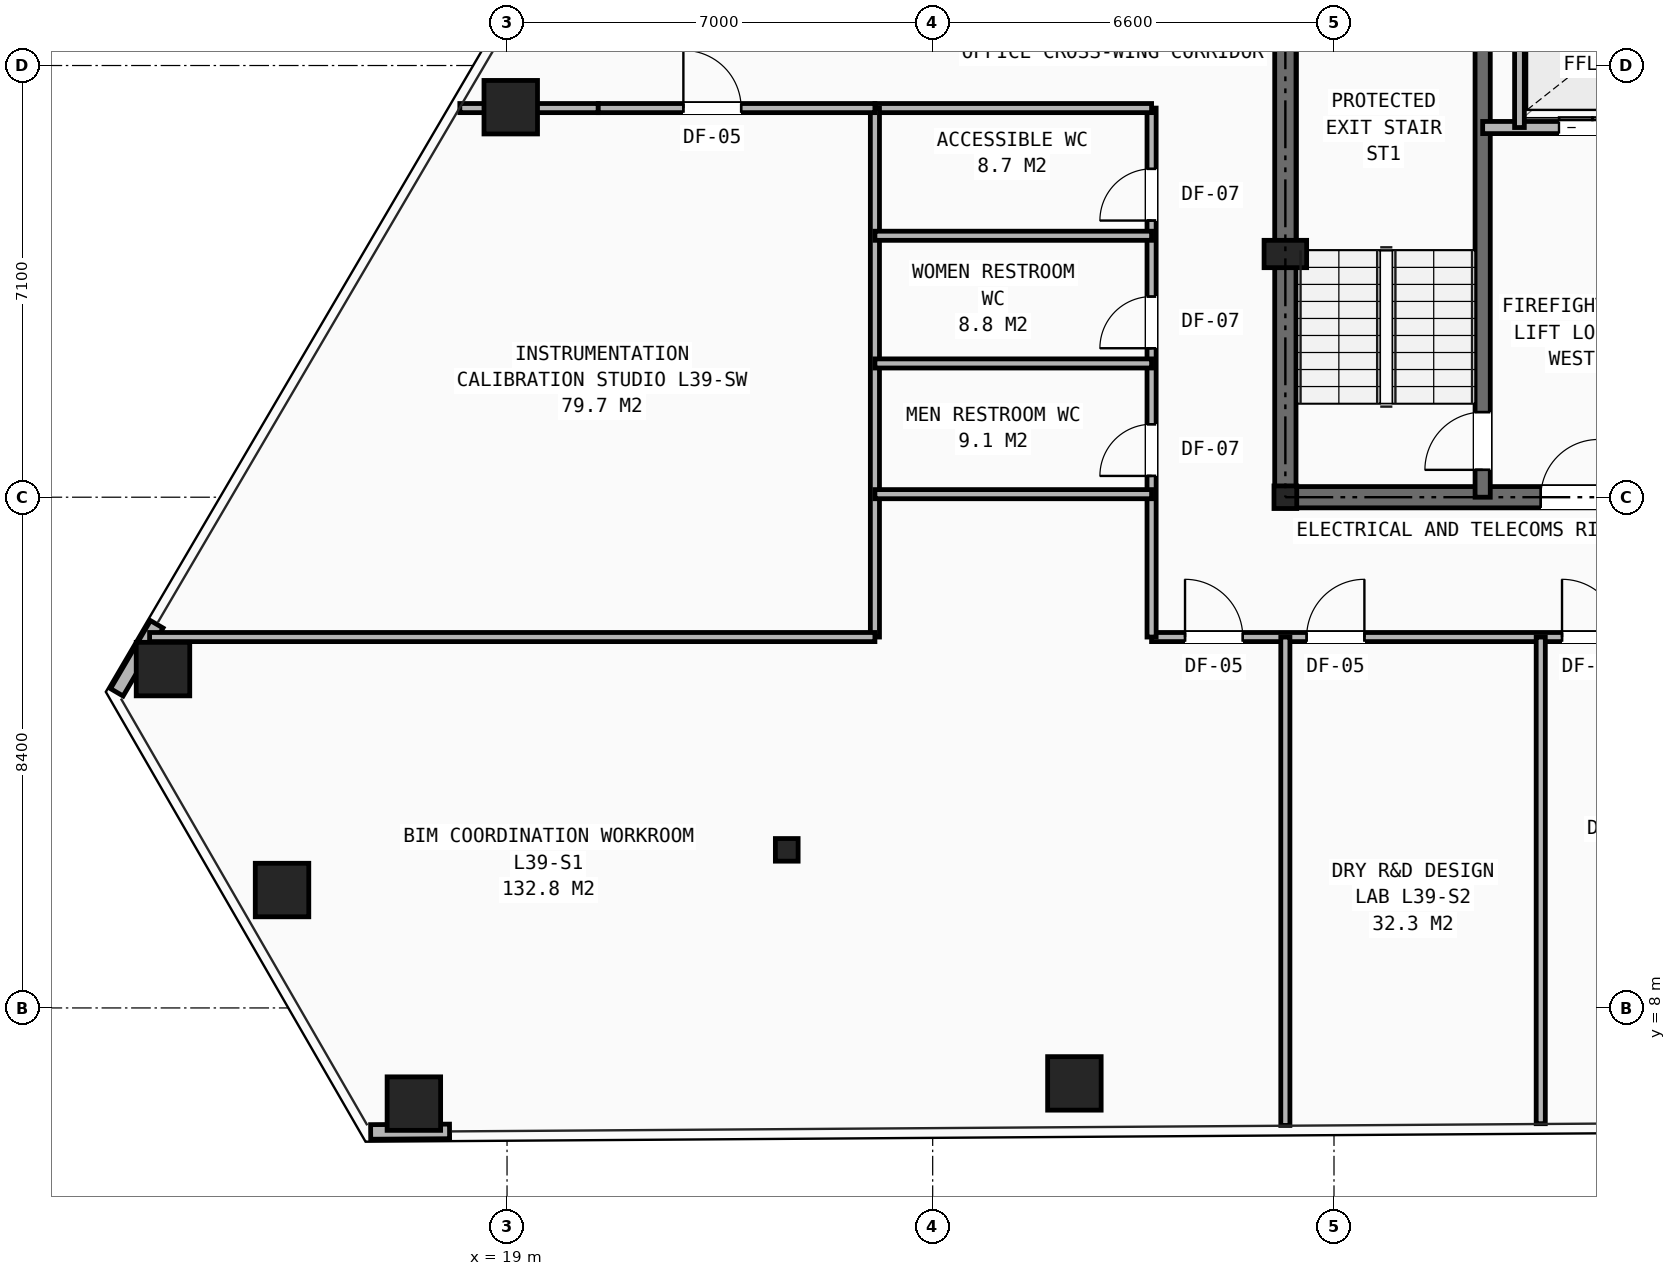
"""IFC4 building model, lengths in metres.
Left out: names, types, materials, properties, quantities, classifications, styles, units other than length and angle.
Written with IfcOpenShell. Run it as: python <this file> out.ifc"""

import sys

from ifc_helpers import new_model, si_unit, direction, frame, frame_2d, origin, origin_2d, place, context, subcontext, project, spatial, rectangle, hollow_rectangle, i_section, extrude, element, fill, save


model = new_model("IFC4")
c1 = context("Model", 3, precision=1e-05, world=origin(), true_north=direction((0.0, 1.0)))
c2 = subcontext(c1, "Body", "Model", "MODEL_VIEW")
j1 = project(units=[si_unit("LENGTHUNIT", "METRE"), si_unit("PLANEANGLEUNIT", "RADIAN")], contexts=[c1])
p1 = place(None, origin())
s1 = spatial("IfcSite", under=j1, at=p1, CompositionType="ELEMENT")
p2 = place(p1, origin())
s2 = spatial("IfcBuilding", under=s1, at=p2, CompositionType="ELEMENT")
p3 = place(p2, frame((0.0, 0.0, 136.7)))
s3 = spatial("IfcBuildingStorey", under=s2, at=p3, CompositionType="ELEMENT", Elevation=136.7)
for number, where, z_axis, x_axis in (
    (1, (31.8, 16.4, 0.0), (0.0, 0.0, 1.0), (1.0, 0.0, 0.0)),
    (2, (23.6, 10.6, 0.0), (0.0, 0.0, 1.0), (1.0, 0.0, 0.0)),
):
    element("IfcColumn", number, at=place(p3, frame(where, z_axis=z_axis, x_axis=x_axis)), inside=s3, PredefinedType="COLUMN", context=c2, shape_type="SweptSolid", body=[
        extrude(i_section(OverallWidth=0.374, OverallDepth=0.372, WebThickness=0.016, FlangeThickness=0.026, at=origin_2d()), origin(), (0.0, 0.0, 1.0), 3.45),
    ])
p4 = place(p3, frame((31.8, 20.4, 0.0), z_axis=(0.0, 0.0, 1.0), x_axis=(1.0, 0.0, 0.0)))
e3 = element("IfcColumn", 3, at=p4, inside=s3, PredefinedType="PILASTER", context=c2, shape_type="SweptSolid", body=[
    extrude(rectangle(XDim=0.7, YDim=0.45, at=origin_2d()), origin(), (0.0, 0.0, 1.0), 3.45),
])
for number, where, z_axis, x_axis in (
    (4, (19.061, 22.814, 0.0), (0.0, 0.0, 1.0), (1.0, 0.0, 0.0)),
    (5, (13.342, 13.573, 0.0), (0.0, 0.0, 1.0), (1.0, 0.0, 0.0)),
    (6, (15.3, 9.939, 0.0), (0.0, 0.0, 1.0), (1.0, 0.0, 0.0)),
    (7, (17.468, 6.427, 0.0), (0.0, 0.0, 1.0), (1.0, 0.0, 0.0)),
    (8, (28.331, 6.759, 0.0), (0.0, 0.0, 1.0), (1.0, 0.0, 0.0)),
):
    element("IfcColumn", number, at=place(p3, frame(where, z_axis=z_axis, x_axis=x_axis)), inside=s3, PredefinedType="COLUMN", context=c2, shape_type="SweptSolid", body=[
        extrude(hollow_rectangle(XDim=0.88, YDim=0.88, WallThickness=0.06, at=origin_2d()), origin(), (0.0, 0.0, 1.0), 3.45),
    ])
for number, where, z_axis, x_axis in (
    (9, (13.239, 14.31, 0.0), (0.0, 0.0, 1.0), (-0.506, -0.863, 0.0)),
    (10, (16.757, 5.961, 0.0), (0.0, 0.0, 1.0), (1.0, 0.007, 0.0)),
):
    element("IfcWall", number, at=place(p3, frame(where, z_axis=z_axis, x_axis=x_axis)), inside=s3, PredefinedType="SHEAR", context=c2, shape_type="SweptSolid", body=[
        extrude(rectangle(XDim=1.298, YDim=0.24, at=frame_2d((0.649, 0.0))), origin(), (0.0, 0.0, 1.0), 2.583),
    ])
p5 = place(p3, frame((31.8, 16.4, 0.0), z_axis=(0.0, 0.0, 1.0), x_axis=(1.0, 0.0, 0.0)))
e11 = element("IfcWall", 11, at=p5, inside=s3, PredefinedType="SHEAR", context=c2, shape_type="SweptSolid", body=[
    extrude(rectangle(XDim=16.4, YDim=0.35, at=frame_2d((8.2, 0.0))), origin(), (0.0, 0.0, 1.0), 3.21),
])
p6 = place(p5, frame((7.75, 0.0, 0.0)))
e12 = element("IfcOpeningElement", 12, at=p6, cuts=e11, PredefinedType="OPENING", context=c2, shape_type="SweptSolid", body=[
    extrude(rectangle(XDim=0.9, YDim=2.1, at=frame_2d((0.45, 1.05))), frame((0.0, 0.185, 0.0), z_axis=(0.0, -1.0, 0.0), x_axis=(1.0, 0.0, 0.0)), (0.0, 0.0, 1.0), 0.37),
])
p7 = place(p5, frame((4.2, 0.0, 0.0)))
e13 = element("IfcOpeningElement", 13, at=p7, cuts=e11, PredefinedType="OPENING", context=c2, shape_type="SweptSolid", body=[
    extrude(rectangle(XDim=0.95, YDim=2.1, at=frame_2d((0.475, 1.05))), frame((0.0, 0.185, 0.0), z_axis=(0.0, -1.0, 0.0), x_axis=(1.0, 0.0, 0.0)), (0.0, 0.0, 1.0), 0.37),
])
p8 = place(p5, frame((10.6, 0.0, 0.0)))
e14 = element("IfcOpeningElement", 14, at=p8, cuts=e11, PredefinedType="OPENING", context=c2, shape_type="SweptSolid", body=[
    extrude(rectangle(XDim=0.95, YDim=2.1, at=frame_2d((0.475, 1.05))), frame((0.0, 0.185, 0.0), z_axis=(0.0, -1.0, 0.0), x_axis=(1.0, 0.0, 0.0)), (0.0, 0.0, 1.0), 0.37),
])
p9 = place(p3, frame((31.8, 16.4, 0.0), z_axis=(0.0, 0.0, 1.0), x_axis=(0.0, 1.0, 0.0)))
e15 = element("IfcWall", 15, at=p9, inside=s3, PredefinedType="SHEAR", context=c2, shape_type="SweptSolid", body=[
    extrude(rectangle(XDim=14.8, YDim=0.35, at=frame_2d((7.4, 0.0))), origin(), (0.0, 0.0, 1.0), 3.21),
])
p10 = place(p9, frame((11.0, 0.0, 0.0)))
e16 = element("IfcOpeningElement", 16, at=p10, cuts=e15, PredefinedType="OPENING", context=c2, shape_type="SweptSolid", body=[
    extrude(rectangle(XDim=1.1, YDim=2.15, at=frame_2d((0.55, 1.075))), frame((0.0, 0.185, 0.0), z_axis=(0.0, -1.0, 0.0), x_axis=(1.0, 0.0, 0.0)), (0.0, 0.0, 1.0), 0.37),
])
p11 = place(p3, frame((35.045, 16.4, 0.0), z_axis=(0.0, 0.0, 1.0), x_axis=(0.0, 1.0, 0.0)))
e17 = element("IfcWall", 17, at=p11, inside=s3, PredefinedType="SHEAR", context=c2, shape_type="SweptSolid", body=[
    extrude(rectangle(XDim=8.4, YDim=0.25, at=frame_2d((4.2, 0.0))), origin(), (0.0, 0.0, 1.0), 3.21),
])
p12 = place(p11, frame((0.45, 0.0, 0.0)))
e18 = element("IfcOpeningElement", 18, at=p12, cuts=e17, PredefinedType="OPENING", context=c2, shape_type="SweptSolid", body=[
    extrude(rectangle(XDim=0.95, YDim=2.1, at=frame_2d((0.475, 1.05))), frame((0.0, 0.135, 0.0), z_axis=(0.0, -1.0, 0.0), x_axis=(1.0, 0.0, 0.0)), (0.0, 0.0, 1.0), 0.27),
])
p13 = place(p3, frame((35.045, 22.48, 0.0), z_axis=(0.0, 0.0, 1.0), x_axis=(1.0, 0.0, 0.0)))
e19 = element("IfcWall", 19, at=p13, inside=s3, PredefinedType="SOLIDWALL", context=c2, shape_type="SweptSolid", body=[
    extrude(rectangle(XDim=9.91, YDim=0.2, at=frame_2d((4.955, 0.0))), origin(), (0.0, 0.0, 1.0), 3.21),
])
p14 = place(p13, frame((1.255, 0.0, 0.0)))
e20 = element("IfcOpeningElement", 20, at=p14, cuts=e19, PredefinedType="OPENING", context=c2, shape_type="SweptSolid", body=[
    extrude(rectangle(XDim=1.1, YDim=2.15, at=frame_2d((0.55, 1.075))), frame((0.0, 0.11, 0.0), z_axis=(0.0, -1.0, 0.0), x_axis=(1.0, 0.0, 0.0)), (0.0, 0.0, 1.0), 0.22),
])
p15 = place(p13, frame((7.555, 0.0, 0.0)))
e21 = element("IfcOpeningElement", 21, at=p15, cuts=e19, PredefinedType="OPENING", context=c2, shape_type="SweptSolid", body=[
    extrude(rectangle(XDim=1.1, YDim=2.15, at=frame_2d((0.55, 1.075))), frame((0.0, 0.11, 0.0), z_axis=(0.0, -1.0, 0.0), x_axis=(1.0, 0.0, 0.0)), (0.0, 0.0, 1.0), 0.22),
])
p16 = place(p13, frame((4.405, 0.0, 0.0)))
e22 = element("IfcOpeningElement", 22, at=p16, cuts=e19, PredefinedType="OPENING", context=c2, shape_type="SweptSolid", body=[
    extrude(rectangle(XDim=1.1, YDim=2.15, at=frame_2d((0.55, 1.075))), frame((0.0, 0.11, 0.0), z_axis=(0.0, -1.0, 0.0), x_axis=(1.0, 0.0, 0.0)), (0.0, 0.0, 1.0), 0.22),
])
p17 = place(p3, frame((35.65, 22.48, 0.0), z_axis=(0.0, 0.0, 1.0), x_axis=(0.0, 1.0, 0.0)))
e23 = element("IfcWall", 23, at=p17, inside=s3, PredefinedType="SOLIDWALL", context=c2, shape_type="SweptSolid", body=[
    extrude(rectangle(XDim=2.32, YDim=0.16, at=frame_2d((1.16, 0.0))), origin(), (0.0, 0.0, 1.0), 3.21),
])
p18 = place(p3, frame((29.6, 14.1, 0.0), z_axis=(0.0, 0.0, 1.0), x_axis=(1.0, 0.0, 0.0)))
e24 = element("IfcWall", 24, at=p18, inside=s3, PredefinedType="PARTITIONING", context=c2, shape_type="SweptSolid", body=[
    extrude(rectangle(XDim=18.6, YDim=0.15, at=frame_2d((9.3, 0.0))), origin(), (0.0, 0.0, 1.0), 2.225),
])
p19 = place(p18, frame((0.55, 0.0, 0.0)))
e25 = element("IfcOpeningElement", 25, at=p19, cuts=e24, PredefinedType="OPENING", context=c2, shape_type="SweptSolid", body=[
    extrude(rectangle(XDim=0.95, YDim=2.1, at=frame_2d((0.475, 1.05))), frame((0.0, 0.085, 0.0), z_axis=(0.0, -1.0, 0.0), x_axis=(1.0, 0.0, 0.0)), (0.0, 0.0, 1.0), 0.17),
])
p20 = place(p18, frame((2.55, 0.0, 0.0)))
e26 = element("IfcOpeningElement", 26, at=p20, cuts=e24, PredefinedType="OPENING", context=c2, shape_type="SweptSolid", body=[
    extrude(rectangle(XDim=0.95, YDim=2.1, at=frame_2d((0.475, 1.05))), frame((0.0, 0.085, 0.0), z_axis=(0.0, -1.0, 0.0), x_axis=(1.0, 0.0, 0.0)), (0.0, 0.0, 1.0), 0.17),
])
p21 = place(p18, frame((6.75, 0.0, 0.0)))
e27 = element("IfcOpeningElement", 27, at=p21, cuts=e24, PredefinedType="OPENING", context=c2, shape_type="SweptSolid", body=[
    extrude(rectangle(XDim=0.95, YDim=2.1, at=frame_2d((0.475, 1.05))), frame((0.0, 0.085, 0.0), z_axis=(0.0, -1.0, 0.0), x_axis=(1.0, 0.0, 0.0)), (0.0, 0.0, 1.0), 0.17),
])
p22 = place(p18, frame((10.95, 0.0, 0.0)))
e28 = element("IfcOpeningElement", 28, at=p22, cuts=e24, PredefinedType="OPENING", context=c2, shape_type="SweptSolid", body=[
    extrude(rectangle(XDim=0.95, YDim=2.1, at=frame_2d((0.475, 1.05))), frame((0.0, 0.085, 0.0), z_axis=(0.0, -1.0, 0.0), x_axis=(1.0, 0.0, 0.0)), (0.0, 0.0, 1.0), 0.17),
])
p23 = place(p18, frame((15.15, 0.0, 0.0)))
e29 = element("IfcOpeningElement", 29, at=p23, cuts=e24, PredefinedType="OPENING", context=c2, shape_type="SweptSolid", body=[
    extrude(rectangle(XDim=0.95, YDim=2.1, at=frame_2d((0.475, 1.05))), frame((0.0, 0.085, 0.0), z_axis=(0.0, -1.0, 0.0), x_axis=(1.0, 0.0, 0.0)), (0.0, 0.0, 1.0), 0.17),
])
p24 = place(p3, frame((29.6, 14.1, 0.0), z_axis=(0.0, 0.0, 1.0), x_axis=(0.0, 1.0, 0.0)))
e30 = element("IfcWall", 30, at=p24, inside=s3, PredefinedType="PARTITIONING", context=c2, shape_type="SweptSolid", body=[
    extrude(rectangle(XDim=8.7, YDim=0.15, at=frame_2d((4.35, 0.0))), origin(), (0.0, 0.0, 1.0), 3.21),
])
p25 = place(p24, frame((2.65, 0.0, 0.0)))
e31 = element("IfcOpeningElement", 31, at=p25, cuts=e30, PredefinedType="OPENING", context=c2, shape_type="SweptSolid", body=[
    extrude(rectangle(XDim=0.85, YDim=2.05, at=frame_2d((0.425, 1.025))), frame((0.0, 0.085, 0.0), z_axis=(0.0, -1.0, 0.0), x_axis=(1.0, 0.0, 0.0)), (0.0, 0.0, 1.0), 0.17),
])
p26 = place(p24, frame((4.75, 0.0, 0.0)))
e32 = element("IfcOpeningElement", 32, at=p26, cuts=e30, PredefinedType="OPENING", context=c2, shape_type="SweptSolid", body=[
    extrude(rectangle(XDim=0.85, YDim=2.05, at=frame_2d((0.425, 1.025))), frame((0.0, 0.085, 0.0), z_axis=(0.0, -1.0, 0.0), x_axis=(1.0, 0.0, 0.0)), (0.0, 0.0, 1.0), 0.17),
])
p27 = place(p24, frame((6.85, 0.0, 0.0)))
e33 = element("IfcOpeningElement", 33, at=p27, cuts=e30, PredefinedType="OPENING", context=c2, shape_type="SweptSolid", body=[
    extrude(rectangle(XDim=0.85, YDim=2.05, at=frame_2d((0.425, 1.025))), frame((0.0, 0.085, 0.0), z_axis=(0.0, -1.0, 0.0), x_axis=(1.0, 0.0, 0.0)), (0.0, 0.0, 1.0), 0.17),
])
p28 = place(p3, frame((18.224, 22.8, 0.0), z_axis=(0.0, 0.0, 1.0), x_axis=(1.0, 0.0, 0.0)))
e34 = element("IfcWall", 34, at=p28, inside=s3, PredefinedType="PARTITIONING", context=c2, shape_type="SweptSolid", body=[
    extrude(rectangle(XDim=2.276, YDim=0.15, at=frame_2d((1.138, 0.0))), origin(), (0.0, 0.0, 1.0), 2.589),
])
p29 = place(p3, frame((25.05, 22.8, 0.0), z_axis=(0.0, 0.0, 1.0), x_axis=(1.0, 0.0, 0.0)))
e35 = element("IfcWall", 35, at=p29, inside=s3, PredefinedType="PARTITIONING", context=c2, shape_type="SweptSolid", body=[
    extrude(rectangle(XDim=4.55, YDim=0.15, at=frame_2d((2.275, 0.0))), origin(), (0.0, 0.0, 1.0), 3.21),
])
p30 = place(p3, frame((25.05, 14.1, 0.0), z_axis=(0.0, 0.0, 1.0), x_axis=(0.0, 1.0, 0.0)))
e36 = element("IfcWall", 36, at=p30, inside=s3, PredefinedType="PARTITIONING", context=c2, shape_type="SweptSolid", body=[
    extrude(rectangle(XDim=8.7, YDim=0.15, at=frame_2d((4.35, 0.0))), origin(), (0.0, 0.0, 1.0), 3.21),
])
for number, where, z_axis, x_axis in (
    (37, (25.05, 16.45, 0.0), (0.0, 0.0, 1.0), (1.0, 0.0, 0.0)),
    (38, (25.05, 18.6, 0.0), (0.0, 0.0, 1.0), (1.0, 0.0, 0.0)),
    (39, (25.05, 20.7, 0.0), (0.0, 0.0, 1.0), (1.0, 0.0, 0.0)),
):
    element("IfcWall", number, at=place(p3, frame(where, z_axis=z_axis, x_axis=x_axis)), inside=s3, PredefinedType="PARTITIONING", context=c2, shape_type="SweptSolid", body=[
        extrude(rectangle(XDim=4.55, YDim=0.15, at=frame_2d((2.275, 0.0))), origin(), (0.0, 0.0, 1.0), 3.21),
    ])
p31 = place(p3, frame((31.8, 6.068, 0.0), z_axis=(0.0, 0.0, 1.0), x_axis=(0.0, 1.0, 0.0)))
e40 = element("IfcWall", 40, at=p31, inside=s3, PredefinedType="PARTITIONING", context=c2, shape_type="SweptSolid", body=[
    extrude(rectangle(XDim=8.032, YDim=0.15, at=frame_2d((4.016, 0.0))), origin(), (0.0, 0.0, 1.0), 2.589),
])
p32 = place(p3, frame((36.0, 6.096, 0.0), z_axis=(0.0, 0.0, 1.0), x_axis=(0.0, 1.0, 0.0)))
e41 = element("IfcWall", 41, at=p32, inside=s3, PredefinedType="PARTITIONING", context=c2, shape_type="SweptSolid", body=[
    extrude(rectangle(XDim=8.004, YDim=0.15, at=frame_2d((4.002, 0.0))), origin(), (0.0, 0.0, 1.0), 2.225),
])
p33 = place(p3, frame((13.122, 14.1, 0.0), z_axis=(0.0, 0.0, 1.0), x_axis=(1.0, 0.0, 0.0)))
e42 = element("IfcWall", 42, at=p33, inside=s3, PredefinedType="PARTITIONING", context=c2, shape_type="SweptSolid", body=[
    extrude(rectangle(XDim=11.928, YDim=0.15, at=frame_2d((5.964, 0.0))), origin(), (0.0, 0.0, 1.0), 2.589),
])
p34 = place(p3, frame((20.5, 22.8, 0.0), z_axis=(0.0, 0.0, 1.0), x_axis=(1.0, 0.0, 0.0)))
e43 = element("IfcWall", 43, at=p34, inside=s3, PredefinedType="PARTITIONING", context=c2, shape_type="SweptSolid", body=[
    extrude(rectangle(XDim=4.55, YDim=0.15, at=frame_2d((2.275, 0.0))), origin(), (0.0, 0.0, 1.0), 3.21),
])
p35 = place(p34, frame((1.4, 0.0, 0.0)))
e44 = element("IfcOpeningElement", 44, at=p35, cuts=e43, PredefinedType="OPENING", context=c2, shape_type="SweptSolid", body=[
    extrude(rectangle(XDim=0.95, YDim=2.1, at=frame_2d((0.475, 1.05))), frame((0.0, 0.085, 0.0), z_axis=(0.0, -1.0, 0.0), x_axis=(1.0, 0.0, 0.0)), (0.0, 0.0, 1.0), 0.17),
])
p36 = place(p12, origin())
e45 = element("IfcDoor", 45, at=p36, inside=s3, OperationType="SINGLE_SWING_LEFT", PredefinedType="DOOR", context=c2, shape_type="SweptSolid", body=[
    extrude(rectangle(XDim=0.95, YDim=2.1, at=frame_2d((0.475, 1.05))), frame((0.0, 0.025, 0.0), z_axis=(0.0, -1.0, 0.0), x_axis=(1.0, 0.0, 0.0)), (0.0, 0.0, 1.0), 0.05),
])
fill(e18, e45)
p37 = place(p7, origin())
e46 = element("IfcDoor", 46, at=p37, inside=s3, OperationType="SINGLE_SWING_RIGHT", PredefinedType="DOOR", context=c2, shape_type="SweptSolid", body=[
    extrude(rectangle(XDim=0.95, YDim=2.1, at=frame_2d((0.475, 1.05))), frame((0.0, 0.025, 0.0), z_axis=(0.0, -1.0, 0.0), x_axis=(1.0, 0.0, 0.0)), (0.0, 0.0, 1.0), 0.05),
])
fill(e13, e46)
p38 = place(p14, origin())
e47 = element("IfcDoor", 47, at=p38, inside=s3, OperationType="DOUBLE_DOOR_SLIDING", PredefinedType="DOOR", context=c2, shape_type="SweptSolid", body=[
    extrude(rectangle(XDim=1.1, YDim=2.15, at=frame_2d((0.55, 1.075))), frame((0.0, 0.025, 0.0), z_axis=(0.0, -1.0, 0.0), x_axis=(1.0, 0.0, 0.0)), (0.0, 0.0, 1.0), 0.05),
])
fill(e20, e47)
p39 = place(p25, origin())
e48 = element("IfcDoor", 48, at=p39, inside=s3, OperationType="SINGLE_SWING_LEFT", PredefinedType="DOOR", context=c2, shape_type="SweptSolid", body=[
    extrude(rectangle(XDim=0.85, YDim=2.05, at=frame_2d((0.425, 1.025))), frame((0.0, 0.025, 0.0), z_axis=(0.0, -1.0, 0.0), x_axis=(1.0, 0.0, 0.0)), (0.0, 0.0, 1.0), 0.05),
])
fill(e31, e48)
p40 = place(p26, origin())
e49 = element("IfcDoor", 49, at=p40, inside=s3, OperationType="SINGLE_SWING_LEFT", PredefinedType="DOOR", context=c2, shape_type="SweptSolid", body=[
    extrude(rectangle(XDim=0.85, YDim=2.05, at=frame_2d((0.425, 1.025))), frame((0.0, 0.025, 0.0), z_axis=(0.0, -1.0, 0.0), x_axis=(1.0, 0.0, 0.0)), (0.0, 0.0, 1.0), 0.05),
])
fill(e32, e49)
p41 = place(p27, origin())
e50 = element("IfcDoor", 50, at=p41, inside=s3, OperationType="SINGLE_SWING_LEFT", PredefinedType="DOOR", context=c2, shape_type="SweptSolid", body=[
    extrude(rectangle(XDim=0.85, YDim=2.05, at=frame_2d((0.425, 1.025))), frame((0.0, 0.025, 0.0), z_axis=(0.0, -1.0, 0.0), x_axis=(1.0, 0.0, 0.0)), (0.0, 0.0, 1.0), 0.05),
])
fill(e33, e50)
p42 = place(p19, origin())
e51 = element("IfcDoor", 51, at=p42, inside=s3, OperationType="SINGLE_SWING_LEFT", PredefinedType="DOOR", context=c2, shape_type="SweptSolid", body=[
    extrude(rectangle(XDim=0.95, YDim=2.1, at=frame_2d((0.475, 1.05))), frame((0.0, 0.025, 0.0), z_axis=(0.0, -1.0, 0.0), x_axis=(1.0, 0.0, 0.0)), (0.0, 0.0, 1.0), 0.05),
])
fill(e25, e51)
p43 = place(p20, origin())
e52 = element("IfcDoor", 52, at=p43, inside=s3, OperationType="SINGLE_SWING_RIGHT", PredefinedType="DOOR", context=c2, shape_type="SweptSolid", body=[
    extrude(rectangle(XDim=0.95, YDim=2.1, at=frame_2d((0.475, 1.05))), frame((0.0, 0.025, 0.0), z_axis=(0.0, -1.0, 0.0), x_axis=(1.0, 0.0, 0.0)), (0.0, 0.0, 1.0), 0.05),
])
fill(e26, e52)
p44 = place(p21, origin())
e53 = element("IfcDoor", 53, at=p44, inside=s3, OperationType="SINGLE_SWING_LEFT", PredefinedType="DOOR", context=c2, shape_type="SweptSolid", body=[
    extrude(rectangle(XDim=0.95, YDim=2.1, at=frame_2d((0.475, 1.05))), frame((0.0, 0.025, 0.0), z_axis=(0.0, -1.0, 0.0), x_axis=(1.0, 0.0, 0.0)), (0.0, 0.0, 1.0), 0.05),
])
fill(e27, e53)
p45 = place(p35, origin())
e54 = element("IfcDoor", 54, at=p45, inside=s3, OperationType="SINGLE_SWING_LEFT", PredefinedType="DOOR", context=c2, shape_type="SweptSolid", body=[
    extrude(rectangle(XDim=0.95, YDim=2.1, at=frame_2d((0.475, 1.05))), frame((0.0, 0.025, 0.0), z_axis=(0.0, -1.0, 0.0), x_axis=(1.0, 0.0, 0.0)), (0.0, 0.0, 1.0), 0.05),
])
fill(e44, e54)
save(model, sys.argv[1])
